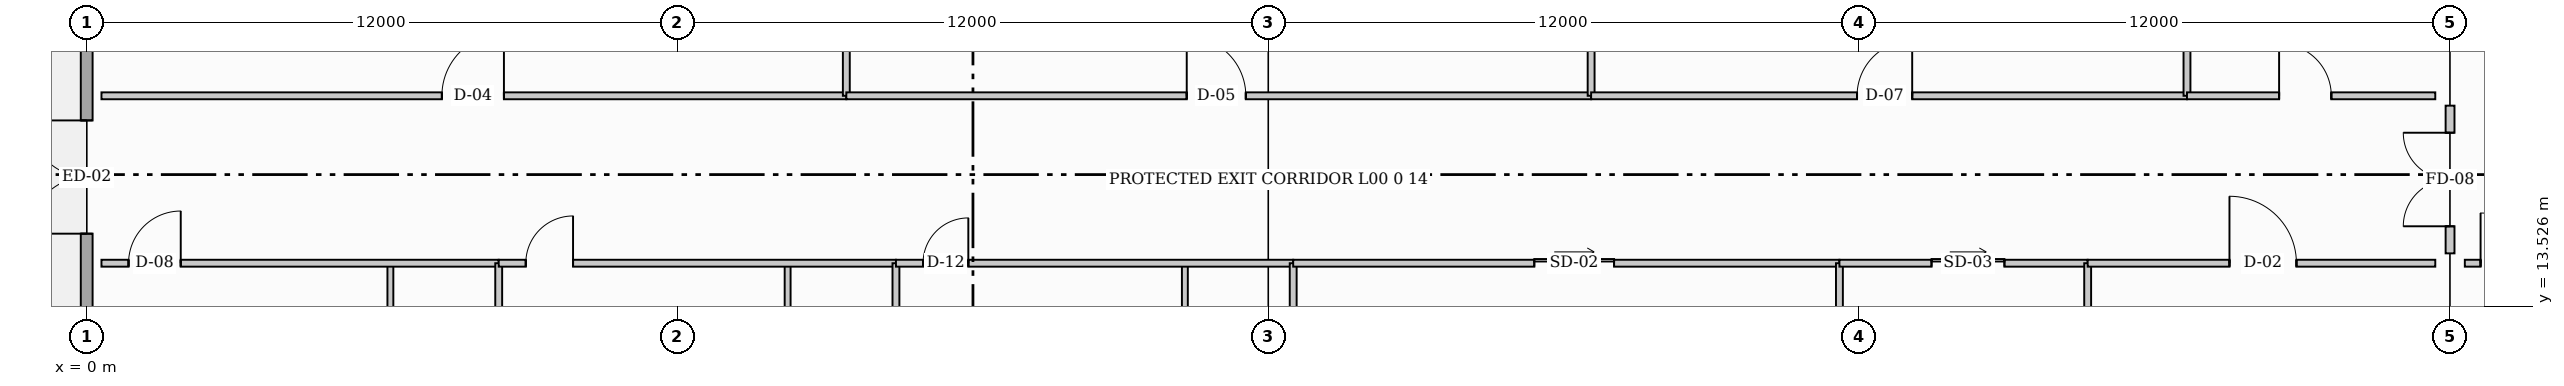
"""IFC4 building model, lengths in metres.
Left out: names, types, materials, properties, quantities, classifications, styles, units other than length and angle.
Written with IfcOpenShell. Run it as: python <this file> out.ifc"""

import sys

from ifc_helpers import new_model, si_unit, direction, frame, frame_2d, origin, place, context, subcontext, project, spatial, rectangle, extrude, element, fill, save


model = new_model("IFC4")
c1 = context("Model", 3, precision=1e-05, world=origin(), true_north=direction((0.0, 1.0)))
c2 = subcontext(c1, "Body", "Model", "MODEL_VIEW")
j1 = project(units=[si_unit("LENGTHUNIT", "METRE"), si_unit("PLANEANGLEUNIT", "RADIAN")], contexts=[c1])
p1 = place(None, origin())
s1 = spatial("IfcSite", under=j1, at=p1, CompositionType="ELEMENT")
p2 = place(p1, origin())
s2 = spatial("IfcBuilding", under=s1, at=p2, CompositionType="ELEMENT")
p3 = place(p2, origin())
s3 = spatial("IfcBuildingStorey", under=s2, at=p3, CompositionType="ELEMENT", Elevation=0.0)
p4 = place(p3, frame((0.0, 0.0, 0.0), z_axis=(0.0, 0.0, 1.0), x_axis=(0.0, 1.0, 0.0)))
e1 = element("IfcWall", 1, at=p4, inside=s3, PredefinedType="STANDARD", context=c2, shape_type="SweptSolid", body=[
    extrude(rectangle(XDim=45.6, YDim=0.24, at=frame_2d((22.8, 0.0))), origin(), (0.0, 0.0, 1.0), 3.738),
])
p5 = place(p4, frame((15.0, 0.0, 0.0)))
e2 = element("IfcOpeningElement", 2, at=p5, cuts=e1, PredefinedType="OPENING", context=c2, shape_type="SweptSolid", body=[
    extrude(rectangle(XDim=2.3, YDim=2.3, at=frame_2d((1.15, 1.15))), frame((0.0, 0.13, 0.0), z_axis=(0.0, -1.0, 0.0), x_axis=(1.0, 0.0, 0.0)), (0.0, 0.0, 1.0), 0.26),
])
p6 = place(p4, frame((1.1, 0.0, 0.95)))
e3 = element("IfcOpeningElement", 3, at=p6, cuts=e1, PredefinedType="OPENING", context=c2, shape_type="SweptSolid", body=[
    extrude(rectangle(XDim=3.0, YDim=1.8, at=frame_2d((1.5, 0.9))), frame((0.0, 0.13, 0.0), z_axis=(0.0, -1.0, 0.0), x_axis=(1.0, 0.0, 0.0)), (0.0, 0.0, 1.0), 0.26),
])
p7 = place(p4, frame((5.6, 0.0, 0.95)))
e4 = element("IfcOpeningElement", 4, at=p7, cuts=e1, PredefinedType="OPENING", context=c2, shape_type="SweptSolid", body=[
    extrude(rectangle(XDim=3.0, YDim=1.8, at=frame_2d((1.5, 0.9))), frame((0.0, 0.13, 0.0), z_axis=(0.0, -1.0, 0.0), x_axis=(1.0, 0.0, 0.0)), (0.0, 0.0, 1.0), 0.26),
])
p8 = place(p4, frame((23.6, 0.0, 0.95)))
e5 = element("IfcOpeningElement", 5, at=p8, cuts=e1, PredefinedType="OPENING", context=c2, shape_type="SweptSolid", body=[
    extrude(rectangle(XDim=3.0, YDim=1.8, at=frame_2d((1.5, 0.9))), frame((0.0, 0.13, 0.0), z_axis=(0.0, -1.0, 0.0), x_axis=(1.0, 0.0, 0.0)), (0.0, 0.0, 1.0), 0.26),
])
p9 = place(p4, frame((28.1, 0.0, 0.95)))
e6 = element("IfcOpeningElement", 6, at=p9, cuts=e1, PredefinedType="OPENING", context=c2, shape_type="SweptSolid", body=[
    extrude(rectangle(XDim=3.0, YDim=1.8, at=frame_2d((1.5, 0.9))), frame((0.0, 0.13, 0.0), z_axis=(0.0, -1.0, 0.0), x_axis=(1.0, 0.0, 0.0)), (0.0, 0.0, 1.0), 0.26),
])
p10 = place(p4, frame((37.1, 0.0, 0.95)))
e7 = element("IfcOpeningElement", 7, at=p10, cuts=e1, PredefinedType="OPENING", context=c2, shape_type="SweptSolid", body=[
    extrude(rectangle(XDim=3.0, YDim=1.8, at=frame_2d((1.5, 0.9))), frame((0.0, 0.13, 0.0), z_axis=(0.0, -1.0, 0.0), x_axis=(1.0, 0.0, 0.0)), (0.0, 0.0, 1.0), 0.26),
])
p11 = place(p4, frame((41.6, 0.0, 0.95)))
e8 = element("IfcOpeningElement", 8, at=p11, cuts=e1, PredefinedType="OPENING", context=c2, shape_type="SweptSolid", body=[
    extrude(rectangle(XDim=3.0, YDim=1.8, at=frame_2d((1.5, 0.9))), frame((0.0, 0.13, 0.0), z_axis=(0.0, -1.0, 0.0), x_axis=(1.0, 0.0, 0.0)), (0.0, 0.0, 1.0), 0.26),
])
p12 = place(p3, frame((6.168, 11.8, 0.0), z_axis=(0.0, 0.0, 1.0), x_axis=(0.0, 1.0, 0.0)))
e9 = element("IfcWall", 9, at=p12, inside=s3, PredefinedType="PARTITIONING", context=c2, shape_type="SweptSolid", body=[
    extrude(rectangle(XDim=2.6, YDim=0.12, at=frame_2d((1.3, 0.0))), origin(), (0.0, 0.0, 1.0), 4.071),
])
p13 = place(p12, frame((0.65, 0.0, 0.0)))
e10 = element("IfcOpeningElement", 10, at=p13, cuts=e9, PredefinedType="OPENING", context=c2, shape_type="SweptSolid", body=[
    extrude(rectangle(XDim=0.96, YDim=2.06, at=frame_2d((0.48, 1.03))), frame((0.0, 0.07, 0.0), z_axis=(0.0, -1.0, 0.0), x_axis=(1.0, 0.0, 0.0)), (0.0, 0.0, 1.0), 0.14),
])
p14 = place(p3, frame((0.3, 14.4, 0.0), z_axis=(0.0, 0.0, 1.0), x_axis=(1.0, 0.0, 0.0)))
e11 = element("IfcWall", 11, at=p14, inside=s3, PredefinedType="PARTITIONING", context=c2, shape_type="SweptSolid", body=[
    extrude(rectangle(XDim=8.068, YDim=0.14, at=frame_2d((4.034, 0.0))), origin(), (0.0, 0.0, 1.0), 4.027),
])
p15 = place(p14, frame((0.55, 0.0, 0.0)))
e12 = element("IfcOpeningElement", 12, at=p15, cuts=e11, PredefinedType="OPENING", context=c2, shape_type="SweptSolid", body=[
    extrude(rectangle(XDim=1.06, YDim=2.1, at=frame_2d((0.53, 1.05))), frame((0.0, 0.08, 0.0), z_axis=(0.0, -1.0, 0.0), x_axis=(1.0, 0.0, 0.0)), (0.0, 0.0, 1.0), 0.16),
])
p16 = place(p3, frame((8.368, 0.3, 0.0), z_axis=(0.0, 0.0, 1.0), x_axis=(0.0, 1.0, 0.0)))
e13 = element("IfcWall", 13, at=p16, inside=s3, PredefinedType="PARTITIONING", context=c2, shape_type="SweptSolid", body=[
    extrude(rectangle(XDim=14.1, YDim=0.14, at=frame_2d((7.05, 0.0))), origin(), (0.0, 0.0, 1.0), 3.738),
])
p17 = place(p3, frame((14.236, 11.8, 0.0), z_axis=(0.0, 0.0, 1.0), x_axis=(0.0, 1.0, 0.0)))
e14 = element("IfcWall", 14, at=p17, inside=s3, PredefinedType="PARTITIONING", context=c2, shape_type="SweptSolid", body=[
    extrude(rectangle(XDim=2.6, YDim=0.12, at=frame_2d((1.3, 0.0))), origin(), (0.0, 0.0, 1.0), 4.074),
])
p18 = place(p17, frame((0.65, 0.0, 0.0)))
e15 = element("IfcOpeningElement", 15, at=p18, cuts=e14, PredefinedType="OPENING", context=c2, shape_type="SweptSolid", body=[
    extrude(rectangle(XDim=0.96, YDim=2.06, at=frame_2d((0.48, 1.03))), frame((0.0, 0.07, 0.0), z_axis=(0.0, -1.0, 0.0), x_axis=(1.0, 0.0, 0.0)), (0.0, 0.0, 1.0), 0.14),
])
p19 = place(p3, frame((8.368, 14.4, 0.0), z_axis=(0.0, 0.0, 1.0), x_axis=(1.0, 0.0, 0.0)))
e16 = element("IfcWall", 16, at=p19, inside=s3, PredefinedType="PARTITIONING", context=c2, shape_type="SweptSolid", body=[
    extrude(rectangle(XDim=8.068, YDim=0.14, at=frame_2d((4.034, 0.0))), origin(), (0.0, 0.0, 1.0), 3.897),
])
p20 = place(p19, frame((0.55, 0.0, 0.0)))
e17 = element("IfcOpeningElement", 17, at=p20, cuts=e16, PredefinedType="OPENING", context=c2, shape_type="SweptSolid", body=[
    extrude(rectangle(XDim=0.96, YDim=2.06, at=frame_2d((0.48, 1.03))), frame((0.0, 0.08, 0.0), z_axis=(0.0, -1.0, 0.0), x_axis=(1.0, 0.0, 0.0)), (0.0, 0.0, 1.0), 0.16),
])
p21 = place(p3, frame((16.436, 0.3, 0.0), z_axis=(0.0, 0.0, 1.0), x_axis=(0.0, 1.0, 0.0)))
e18 = element("IfcWall", 18, at=p21, inside=s3, PredefinedType="PARTITIONING", context=c2, shape_type="SweptSolid", body=[
    extrude(rectangle(XDim=14.1, YDim=0.14, at=frame_2d((7.05, 0.0))), origin(), (0.0, 0.0, 1.0), 3.818),
])
p22 = place(p3, frame((22.304, 11.8, 0.0), z_axis=(0.0, 0.0, 1.0), x_axis=(0.0, 1.0, 0.0)))
e19 = element("IfcWall", 19, at=p22, inside=s3, PredefinedType="PARTITIONING", context=c2, shape_type="SweptSolid", body=[
    extrude(rectangle(XDim=2.6, YDim=0.12, at=frame_2d((1.3, 0.0))), origin(), (0.0, 0.0, 1.0), 4.074),
])
p23 = place(p22, frame((0.65, 0.0, 0.0)))
e20 = element("IfcOpeningElement", 20, at=p23, cuts=e19, PredefinedType="OPENING", context=c2, shape_type="SweptSolid", body=[
    extrude(rectangle(XDim=0.96, YDim=2.06, at=frame_2d((0.48, 1.03))), frame((0.0, 0.07, 0.0), z_axis=(0.0, -1.0, 0.0), x_axis=(1.0, 0.0, 0.0)), (0.0, 0.0, 1.0), 0.14),
])
p24 = place(p3, frame((16.436, 14.4, 0.0), z_axis=(0.0, 0.0, 1.0), x_axis=(1.0, 0.0, 0.0)))
e21 = element("IfcWall", 21, at=p24, inside=s3, PredefinedType="PARTITIONING", context=c2, shape_type="SweptSolid", body=[
    extrude(rectangle(XDim=8.068, YDim=0.14, at=frame_2d((4.034, 0.0))), origin(), (0.0, 0.0, 1.0), 3.902),
])
p25 = place(p24, frame((0.55, 0.0, 0.0)))
e22 = element("IfcOpeningElement", 22, at=p25, cuts=e21, PredefinedType="OPENING", context=c2, shape_type="SweptSolid", body=[
    extrude(rectangle(XDim=0.92, YDim=2.04, at=frame_2d((0.46, 1.02))), frame((0.0, 0.08, 0.0), z_axis=(0.0, -1.0, 0.0), x_axis=(1.0, 0.0, 0.0)), (0.0, 0.0, 1.0), 0.16),
])
p26 = place(p3, frame((24.504, 0.3, 0.0), z_axis=(0.0, 0.0, 1.0), x_axis=(0.0, 1.0, 0.0)))
e23 = element("IfcWall", 23, at=p26, inside=s3, PredefinedType="PARTITIONING", context=c2, shape_type="SweptSolid", body=[
    extrude(rectangle(XDim=14.1, YDim=0.14, at=frame_2d((7.05, 0.0))), origin(), (0.0, 0.0, 1.0), 3.823),
])
p27 = place(p3, frame((24.504, 14.4, 0.0), z_axis=(0.0, 0.0, 1.0), x_axis=(1.0, 0.0, 0.0)))
e24 = element("IfcWall", 24, at=p27, inside=s3, PredefinedType="PARTITIONING", context=c2, shape_type="SweptSolid", body=[
    extrude(rectangle(XDim=11.094, YDim=0.14, at=frame_2d((5.547, 0.0))), origin(), (0.0, 0.0, 1.0), 4.123),
])
p28 = place(p27, frame((4.897, 0.0, 0.0)))
e25 = element("IfcOpeningElement", 25, at=p28, cuts=e24, PredefinedType="OPENING", context=c2, shape_type="SweptSolid", body=[
    extrude(rectangle(XDim=1.62, YDim=2.3, at=frame_2d((0.81, 1.15))), frame((0.0, 0.08, 0.0), z_axis=(0.0, -1.0, 0.0), x_axis=(1.0, 0.0, 0.0)), (0.0, 0.0, 1.0), 0.16),
])
p29 = place(p3, frame((35.598, 0.3, 0.0), z_axis=(0.0, 0.0, 1.0), x_axis=(0.0, 1.0, 0.0)))
e26 = element("IfcWall", 26, at=p29, inside=s3, PredefinedType="PARTITIONING", context=c2, shape_type="SweptSolid", body=[
    extrude(rectangle(XDim=14.1, YDim=0.14, at=frame_2d((7.05, 0.0))), origin(), (0.0, 0.0, 1.0), 3.823),
])
p30 = place(p3, frame((35.598, 14.4, 0.0), z_axis=(0.0, 0.0, 1.0), x_axis=(1.0, 0.0, 0.0)))
e27 = element("IfcWall", 27, at=p30, inside=s3, PredefinedType="PARTITIONING", context=c2, shape_type="SweptSolid", body=[
    extrude(rectangle(XDim=5.042, YDim=0.14, at=frame_2d((2.521, 0.0))), origin(), (0.0, 0.0, 1.0), 3.97),
])
p31 = place(p30, frame((1.871, 0.0, 0.0)))
e28 = element("IfcOpeningElement", 28, at=p31, cuts=e27, PredefinedType="OPENING", context=c2, shape_type="SweptSolid", body=[
    extrude(rectangle(XDim=1.48, YDim=2.26, at=frame_2d((0.74, 1.13))), frame((0.0, 0.08, 0.0), z_axis=(0.0, -1.0, 0.0), x_axis=(1.0, 0.0, 0.0)), (0.0, 0.0, 1.0), 0.16),
])
p32 = place(p3, frame((40.64, 0.3, 0.0), z_axis=(0.0, 0.0, 1.0), x_axis=(0.0, 1.0, 0.0)))
e29 = element("IfcWall", 29, at=p32, inside=s3, PredefinedType="PARTITIONING", context=c2, shape_type="SweptSolid", body=[
    extrude(rectangle(XDim=14.1, YDim=0.14, at=frame_2d((7.05, 0.0))), origin(), (0.0, 0.0, 1.0), 3.828),
])
p33 = place(p3, frame((40.64, 14.4, 0.0), z_axis=(0.0, 0.0, 1.0), x_axis=(1.0, 0.0, 0.0)))
e30 = element("IfcWall", 30, at=p33, inside=s3, PredefinedType="PARTITIONING", context=c2, shape_type="SweptSolid", body=[
    extrude(rectangle(XDim=7.06, YDim=0.14, at=frame_2d((3.53, 0.0))), origin(), (0.0, 0.0, 1.0), 3.973),
])
p34 = place(p33, frame((2.88, 0.0, 0.0)))
e31 = element("IfcOpeningElement", 31, at=p34, cuts=e30, PredefinedType="OPENING", context=c2, shape_type="SweptSolid", body=[
    extrude(rectangle(XDim=1.36, YDim=2.18, at=frame_2d((0.68, 1.09))), frame((0.0, 0.08, 0.0), z_axis=(0.0, -1.0, 0.0), x_axis=(1.0, 0.0, 0.0)), (0.0, 0.0, 1.0), 0.16),
])
p35 = place(p3, frame((0.3, 17.8, 0.0), z_axis=(0.0, 0.0, 1.0), x_axis=(1.0, 0.0, 0.0)))
e32 = element("IfcWall", 32, at=p35, inside=s3, PredefinedType="PARTITIONING", context=c2, shape_type="SweptSolid", body=[
    extrude(rectangle(XDim=15.128, YDim=0.14, at=frame_2d((7.564, 0.0))), origin(), (0.0, 0.0, 1.0), 3.897),
])
p36 = place(p35, frame((6.914, 0.0, 0.0)))
e33 = element("IfcOpeningElement", 33, at=p36, cuts=e32, PredefinedType="OPENING", context=c2, shape_type="SweptSolid", body=[
    extrude(rectangle(XDim=1.26, YDim=2.14, at=frame_2d((0.63, 1.07))), frame((0.0, 0.08, 0.0), z_axis=(0.0, -1.0, 0.0), x_axis=(1.0, 0.0, 0.0)), (0.0, 0.0, 1.0), 0.16),
])
p37 = place(p3, frame((15.428, 17.8, 0.0), z_axis=(0.0, 0.0, 1.0), x_axis=(0.0, 1.0, 0.0)))
e34 = element("IfcWall", 34, at=p37, inside=s3, PredefinedType="PARTITIONING", context=c2, shape_type="SweptSolid", body=[
    extrude(rectangle(XDim=16.75, YDim=0.14, at=frame_2d((8.375, 0.0))), origin(), (0.0, 0.0, 1.0), 3.823),
])
p38 = place(p3, frame((15.428, 17.8, 0.0), z_axis=(0.0, 0.0, 1.0), x_axis=(1.0, 0.0, 0.0)))
e35 = element("IfcWall", 35, at=p38, inside=s3, PredefinedType="PARTITIONING", context=c2, shape_type="SweptSolid", body=[
    extrude(rectangle(XDim=15.127, YDim=0.14, at=frame_2d((7.563, 0.0))), origin(), (0.0, 0.0, 1.0), 3.902),
])
p39 = place(p38, frame((6.914, 0.0, 0.0)))
e36 = element("IfcOpeningElement", 36, at=p39, cuts=e35, PredefinedType="OPENING", context=c2, shape_type="SweptSolid", body=[
    extrude(rectangle(XDim=1.2, YDim=2.12, at=frame_2d((0.6, 1.06))), frame((0.0, 0.08, 0.0), z_axis=(0.0, -1.0, 0.0), x_axis=(1.0, 0.0, 0.0)), (0.0, 0.0, 1.0), 0.16),
])
p40 = place(p3, frame((30.555, 17.8, 0.0), z_axis=(0.0, 0.0, 1.0), x_axis=(0.0, 1.0, 0.0)))
e37 = element("IfcWall", 37, at=p40, inside=s3, PredefinedType="PARTITIONING", context=c2, shape_type="SweptSolid", body=[
    extrude(rectangle(XDim=27.5, YDim=0.14, at=frame_2d((13.75, 0.0))), origin(), (0.0, 0.0, 1.0), 3.828),
])
p41 = place(p3, frame((30.555, 17.8, 0.0), z_axis=(0.0, 0.0, 1.0), x_axis=(1.0, 0.0, 0.0)))
e38 = element("IfcWall", 38, at=p41, inside=s3, PredefinedType="PARTITIONING", context=c2, shape_type="SweptSolid", body=[
    extrude(rectangle(XDim=12.102, YDim=0.14, at=frame_2d((6.051, 0.0))), origin(), (0.0, 0.0, 1.0), 3.97),
])
p42 = place(p41, frame((5.401, 0.0, 0.0)))
e39 = element("IfcOpeningElement", 39, at=p42, cuts=e38, PredefinedType="OPENING", context=c2, shape_type="SweptSolid", body=[
    extrude(rectangle(XDim=1.12, YDim=2.08, at=frame_2d((0.56, 1.04))), frame((0.0, 0.08, 0.0), z_axis=(0.0, -1.0, 0.0), x_axis=(1.0, 0.0, 0.0)), (0.0, 0.0, 1.0), 0.16),
])
p43 = place(p3, frame((42.657, 17.8, 0.0), z_axis=(0.0, 0.0, 1.0), x_axis=(0.0, 1.0, 0.0)))
e40 = element("IfcWall", 40, at=p43, inside=s3, PredefinedType="PARTITIONING", context=c2, shape_type="SweptSolid", body=[
    extrude(rectangle(XDim=27.5, YDim=0.14, at=frame_2d((13.75, 0.0))), origin(), (0.0, 0.0, 1.0), 3.897),
])
p44 = place(p3, frame((42.657, 17.8, 0.0), z_axis=(0.0, 0.0, 1.0), x_axis=(1.0, 0.0, 0.0)))
e41 = element("IfcWall", 41, at=p44, inside=s3, PredefinedType="PARTITIONING", context=c2, shape_type="SweptSolid", body=[
    extrude(rectangle(XDim=5.043, YDim=0.14, at=frame_2d((2.521, 0.0))), origin(), (0.0, 0.0, 1.0), 3.973),
])
p45 = place(p44, frame((1.871, 0.0, 0.0)))
e42 = element("IfcOpeningElement", 42, at=p45, cuts=e41, PredefinedType="OPENING", context=c2, shape_type="SweptSolid", body=[
    extrude(rectangle(XDim=1.06, YDim=2.1, at=frame_2d((0.53, 1.05))), frame((0.0, 0.08, 0.0), z_axis=(0.0, -1.0, 0.0), x_axis=(1.0, 0.0, 0.0)), (0.0, 0.0, 1.0), 0.16),
])
p46 = place(p3, frame((48.0, 14.6, 0.0), z_axis=(0.0, 0.0, 1.0), x_axis=(0.0, 1.0, 0.0)))
e43 = element("IfcWall", 43, at=p46, inside=s3, PredefinedType="PARTITIONING", context=c2, shape_type="SweptSolid", body=[
    extrude(rectangle(XDim=3.0, YDim=0.18, at=frame_2d((1.5, 0.0))), origin(), (0.0, 0.0, 1.0), 3.973),
])
p47 = place(p46, frame((0.55, 0.0, 0.0)))
e44 = element("IfcOpeningElement", 44, at=p47, cuts=e43, PredefinedType="OPENING", context=c2, shape_type="SweptSolid", body=[
    extrude(rectangle(XDim=1.9, YDim=2.25, at=frame_2d((0.95, 1.125))), frame((0.0, 0.1, 0.0), z_axis=(0.0, -1.0, 0.0), x_axis=(1.0, 0.0, 0.0)), (0.0, 0.0, 1.0), 0.2),
])
p48 = place(p3, frame((48.3, 14.4, 0.0), z_axis=(0.0, 0.0, 1.0), x_axis=(1.0, 0.0, 0.0)))
e45 = element("IfcWall", 45, at=p48, inside=s3, PredefinedType="PARTITIONING", context=c2, shape_type="SweptSolid", body=[
    extrude(rectangle(XDim=18.765, YDim=0.14, at=frame_2d((9.382, 0.0))), origin(), (0.0, 0.0, 1.0), 3.973),
])
p49 = place(p48, frame((0.32, 0.0, 0.0)))
e46 = element("IfcOpeningElement", 46, at=p49, cuts=e45, PredefinedType="OPENING", context=c2, shape_type="SweptSolid", body=[
    extrude(rectangle(XDim=1.02, YDim=2.08, at=frame_2d((0.51, 1.04))), frame((0.0, 0.08, 0.0), z_axis=(0.0, -1.0, 0.0), x_axis=(1.0, 0.0, 0.0)), (0.0, 0.0, 1.0), 0.16),
])
p50 = place(p5, origin())
e47 = element("IfcDoor", 47, at=p50, inside=s3, OperationType="DOUBLE_DOOR_SINGLE_SWING", PredefinedType="DOOR", context=c2, shape_type="SweptSolid", body=[
    extrude(rectangle(XDim=2.3, YDim=2.3, at=frame_2d((1.15, 1.15))), frame((0.0, 0.025, 0.0), z_axis=(0.0, -1.0, 0.0), x_axis=(1.0, 0.0, 0.0)), (0.0, 0.0, 1.0), 0.05),
])
fill(e2, e47)
p51 = place(p15, origin())
e48 = element("IfcDoor", 48, at=p51, inside=s3, OperationType="SINGLE_SWING_RIGHT", PredefinedType="DOOR", context=c2, shape_type="SweptSolid", body=[
    extrude(rectangle(XDim=1.06, YDim=2.1, at=frame_2d((0.53, 1.05))), frame((0.0, 0.025, 0.0), z_axis=(0.0, -1.0, 0.0), x_axis=(1.0, 0.0, 0.0)), (0.0, 0.0, 1.0), 0.05),
])
fill(e12, e48)
p52 = place(p20, origin())
e49 = element("IfcDoor", 49, at=p52, inside=s3, OperationType="SINGLE_SWING_RIGHT", PredefinedType="DOOR", context=c2, shape_type="SweptSolid", body=[
    extrude(rectangle(XDim=0.96, YDim=2.06, at=frame_2d((0.48, 1.03))), frame((0.0, 0.025, 0.0), z_axis=(0.0, -1.0, 0.0), x_axis=(1.0, 0.0, 0.0)), (0.0, 0.0, 1.0), 0.05),
])
fill(e17, e49)
p53 = place(p25, origin())
e50 = element("IfcDoor", 50, at=p53, inside=s3, OperationType="SINGLE_SWING_RIGHT", PredefinedType="DOOR", context=c2, shape_type="SweptSolid", body=[
    extrude(rectangle(XDim=0.92, YDim=2.04, at=frame_2d((0.46, 1.02))), frame((0.0, 0.025, 0.0), z_axis=(0.0, -1.0, 0.0), x_axis=(1.0, 0.0, 0.0)), (0.0, 0.0, 1.0), 0.05),
])
fill(e22, e50)
p54 = place(p28, origin())
e51 = element("IfcDoor", 51, at=p54, inside=s3, OperationType="SLIDING_TO_RIGHT", PredefinedType="DOOR", context=c2, shape_type="SweptSolid", body=[
    extrude(rectangle(XDim=1.62, YDim=2.3, at=frame_2d((0.81, 1.15))), frame((0.0, 0.025, 0.0), z_axis=(0.0, -1.0, 0.0), x_axis=(1.0, 0.0, 0.0)), (0.0, 0.0, 1.0), 0.05),
])
fill(e25, e51)
p55 = place(p31, origin())
e52 = element("IfcDoor", 52, at=p55, inside=s3, OperationType="SLIDING_TO_LEFT", PredefinedType="DOOR", context=c2, shape_type="SweptSolid", body=[
    extrude(rectangle(XDim=1.48, YDim=2.26, at=frame_2d((0.74, 1.13))), frame((0.0, 0.025, 0.0), z_axis=(0.0, -1.0, 0.0), x_axis=(1.0, 0.0, 0.0)), (0.0, 0.0, 1.0), 0.05),
])
fill(e28, e52)
p56 = place(p34, origin())
e53 = element("IfcDoor", 53, at=p56, inside=s3, OperationType="SINGLE_SWING_LEFT", PredefinedType="DOOR", context=c2, shape_type="SweptSolid", body=[
    extrude(rectangle(XDim=1.36, YDim=2.18, at=frame_2d((0.68, 1.09))), frame((0.0, 0.025, 0.0), z_axis=(0.0, -1.0, 0.0), x_axis=(1.0, 0.0, 0.0)), (0.0, 0.0, 1.0), 0.05),
])
fill(e31, e53)
p57 = place(p36, origin())
e54 = element("IfcDoor", 54, at=p57, inside=s3, OperationType="SINGLE_SWING_RIGHT", PredefinedType="DOOR", context=c2, shape_type="SweptSolid", body=[
    extrude(rectangle(XDim=1.26, YDim=2.14, at=frame_2d((0.63, 1.07))), frame((0.0, 0.025, 0.0), z_axis=(0.0, -1.0, 0.0), x_axis=(1.0, 0.0, 0.0)), (0.0, 0.0, 1.0), 0.05),
])
fill(e33, e54)
p58 = place(p39, origin())
e55 = element("IfcDoor", 55, at=p58, inside=s3, OperationType="SINGLE_SWING_LEFT", PredefinedType="DOOR", context=c2, shape_type="SweptSolid", body=[
    extrude(rectangle(XDim=1.2, YDim=2.12, at=frame_2d((0.6, 1.06))), frame((0.0, 0.025, 0.0), z_axis=(0.0, -1.0, 0.0), x_axis=(1.0, 0.0, 0.0)), (0.0, 0.0, 1.0), 0.05),
])
fill(e36, e55)
p59 = place(p42, origin())
e56 = element("IfcDoor", 56, at=p59, inside=s3, OperationType="SINGLE_SWING_RIGHT", PredefinedType="DOOR", context=c2, shape_type="SweptSolid", body=[
    extrude(rectangle(XDim=1.12, YDim=2.08, at=frame_2d((0.56, 1.04))), frame((0.0, 0.025, 0.0), z_axis=(0.0, -1.0, 0.0), x_axis=(1.0, 0.0, 0.0)), (0.0, 0.0, 1.0), 0.05),
])
fill(e39, e56)
p60 = place(p45, origin())
e57 = element("IfcDoor", 57, at=p60, inside=s3, OperationType="SINGLE_SWING_LEFT", PredefinedType="DOOR", context=c2, shape_type="SweptSolid", body=[
    extrude(rectangle(XDim=1.06, YDim=2.1, at=frame_2d((0.53, 1.05))), frame((0.0, 0.025, 0.0), z_axis=(0.0, -1.0, 0.0), x_axis=(1.0, 0.0, 0.0)), (0.0, 0.0, 1.0), 0.05),
])
fill(e42, e57)
p61 = place(p47, origin())
e58 = element("IfcDoor", 58, at=p61, inside=s3, OperationType="DOUBLE_DOOR_SINGLE_SWING", PredefinedType="DOOR", context=c2, shape_type="SweptSolid", body=[
    extrude(rectangle(XDim=1.9, YDim=2.25, at=frame_2d((0.95, 1.125))), frame((0.0, 0.025, 0.0), z_axis=(0.0, -1.0, 0.0), x_axis=(1.0, 0.0, 0.0)), (0.0, 0.0, 1.0), 0.05),
])
fill(e44, e58)
p62 = place(p49, origin())
e59 = element("IfcDoor", 59, at=p62, inside=s3, OperationType="SINGLE_SWING_LEFT", PredefinedType="DOOR", context=c2, shape_type="SweptSolid", body=[
    extrude(rectangle(XDim=1.02, YDim=2.08, at=frame_2d((0.51, 1.04))), frame((0.0, 0.025, 0.0), z_axis=(0.0, -1.0, 0.0), x_axis=(1.0, 0.0, 0.0)), (0.0, 0.0, 1.0), 0.05),
])
fill(e46, e59)
save(model, sys.argv[1])
